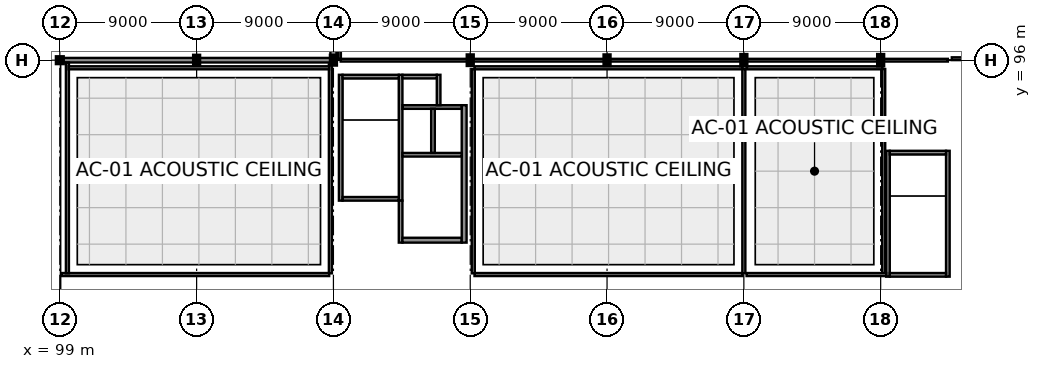
"""IFC4 building model, lengths in metres.
Left out: names, types, materials, properties, quantities, classifications, styles, units other than length and angle.
Written with IfcOpenShell. Run it as: python <this file> out.ifc"""

import sys

from ifc_helpers import new_model, si_unit, direction, frame, frame_2d, origin, origin_2d, place, context, subcontext, project, spatial, rectangle, hollow_circle, i_section, extrude, element, fill, save


model = new_model("IFC4")
c1 = context("Model", 3, precision=1e-05, world=origin(), true_north=direction((0.0, 1.0)))
c2 = subcontext(c1, "Body", "Model", "MODEL_VIEW")
j1 = project(units=[si_unit("LENGTHUNIT", "METRE"), si_unit("PLANEANGLEUNIT", "RADIAN")], contexts=[c1])
p1 = place(None, origin())
s1 = spatial("IfcSite", under=j1, at=p1, CompositionType="ELEMENT")
p2 = place(p1, origin())
s2 = spatial("IfcBuilding", under=s1, at=p2, CompositionType="ELEMENT")
p3 = place(p2, frame((0.0, 0.0, 5.4)))
s3 = spatial("IfcBuildingStorey", under=s2, at=p3, CompositionType="ELEMENT", Elevation=5.4)
p4 = place(p3, frame((99.0, 96.0, 0.0), z_axis=(0.0, 0.0, 1.0), x_axis=(1.0, 0.0, 0.0)))
e1 = element("IfcColumn", 1, at=p4, inside=s3, PredefinedType="PILASTER", context=c2, shape_type="SweptSolid", body=[
    extrude(hollow_circle(Radius=0.178, WallThickness=0.016, at=origin_2d()), origin(), (0.0, 0.0, 1.0), 4.5),
])
for number, where, z_axis, x_axis in (
    (2, (108.0, 96.0, 0.0), (0.0, 0.0, 1.0), (1.0, 0.0, 0.0)),
    (3, (117.0, 96.0, 0.0), (0.0, 0.0, 1.0), (1.0, 0.0, 0.0)),
):
    element("IfcColumn", number, at=place(p3, frame(where, z_axis=z_axis, x_axis=x_axis)), inside=s3, PredefinedType="COLUMN", context=c2, shape_type="SweptSolid", body=[
        extrude(i_section(OverallWidth=0.3, OverallDepth=0.55, WebThickness=0.015, FlangeThickness=0.029, at=origin_2d()), origin(), (0.0, 0.0, 1.0), 4.5),
    ])
for number, where, z_axis, x_axis in (
    (4, (126.0, 96.0, 0.0), (0.0, 0.0, 1.0), (0.0, 1.0, 0.0)),
    (5, (135.0, 96.0, 0.0), (0.0, 0.0, 1.0), (1.0, 0.0, 0.0)),
):
    element("IfcColumn", number, at=place(p3, frame(where, z_axis=z_axis, x_axis=x_axis)), inside=s3, PredefinedType="COLUMN", context=c2, shape_type="SweptSolid", body=[
        extrude(i_section(OverallWidth=0.3, OverallDepth=0.6, WebThickness=0.015, FlangeThickness=0.03, at=origin_2d()), origin(), (0.0, 0.0, 1.0), 4.5),
    ])
for number, where, z_axis, x_axis in (
    (6, (144.0, 96.0, 0.0), (0.0, 0.0, 1.0), (1.0, 0.0, 0.0)),
    (7, (153.0, 96.0, 0.0), (0.0, 0.0, 1.0), (1.0, 0.0, 0.0)),
):
    element("IfcColumn", number, at=place(p3, frame(where, z_axis=z_axis, x_axis=x_axis)), inside=s3, PredefinedType="COLUMN", context=c2, shape_type="SweptSolid", body=[
        extrude(i_section(OverallWidth=0.3, OverallDepth=0.65, WebThickness=0.016, FlangeThickness=0.031, at=origin_2d()), origin(), (0.0, 0.0, 1.0), 4.5),
    ])
p5 = place(p3, frame((116.992, 96.0, 0.0), z_axis=(0.0, 0.0, 1.0), x_axis=(-1.0, 0.0, 0.0)))
e8 = element("IfcWall", 8, at=p5, inside=s3, PredefinedType="SOLIDWALL", context=c2, shape_type="SweptSolid", body=[
    extrude(rectangle(XDim=8.984, YDim=0.3, at=frame_2d((4.492, 0.0))), origin(), (0.0, 0.0, 1.0), 3.655),
])
p6 = place(p3, frame((107.992, 96.0, 0.0), z_axis=(0.0, 0.0, 1.0), x_axis=(-1.0, 0.0, 0.0)))
e9 = element("IfcWall", 9, at=p6, inside=s3, PredefinedType="SOLIDWALL", context=c2, shape_type="SweptSolid", body=[
    extrude(rectangle(XDim=8.768, YDim=0.3, at=frame_2d((4.384, 0.0))), origin(), (0.0, 0.0, 1.0), 3.655),
])
p7 = place(p6, frame((1.455, 0.0, 0.8)))
e10 = element("IfcOpeningElement", 10, at=p7, cuts=e9, PredefinedType="OPENING", context=c2, shape_type="SweptSolid", body=[
    extrude(rectangle(XDim=2.0, YDim=2.0, at=frame_2d((1.0, 1.0))), frame((0.0, 0.165, 0.0), z_axis=(0.0, -1.0, 0.0), x_axis=(1.0, 0.0, 0.0)), (0.0, 0.0, 1.0), 0.33),
])
p8 = place(p6, frame((5.313, 0.0, 0.8)))
e11 = element("IfcOpeningElement", 11, at=p8, cuts=e9, PredefinedType="OPENING", context=c2, shape_type="SweptSolid", body=[
    extrude(rectangle(XDim=2.0, YDim=2.0, at=frame_2d((1.0, 1.0))), frame((0.0, 0.165, 0.0), z_axis=(0.0, -1.0, 0.0), x_axis=(1.0, 0.0, 0.0)), (0.0, 0.0, 1.0), 0.33),
])
p9 = place(p3, frame((117.0, 107.862, 0.0), z_axis=(0.0, 0.0, 1.0), x_axis=(0.0, -1.0, 0.0)))
e12 = element("IfcWall", 12, at=p9, inside=s3, PredefinedType="SOLIDWALL", context=c2, shape_type="SweptSolid", body=[
    extrude(rectangle(XDim=11.589, YDim=0.4, at=frame_2d((5.794, 0.0))), origin(), (0.0, 0.0, 1.0), 4.18),
])
p10 = place(p9, frame((2.877, 0.0, 2.35)))
e13 = element("IfcOpeningElement", 13, at=p10, cuts=e12, PredefinedType="OPENING", context=c2, shape_type="SweptSolid", body=[
    extrude(rectangle(XDim=1.2, YDim=0.7, at=frame_2d((0.6, 0.35))), frame((0.0, 0.215, 0.0), z_axis=(0.0, -1.0, 0.0), x_axis=(1.0, 0.0, 0.0)), (0.0, 0.0, 1.0), 0.43),
])
p11 = place(p9, frame((7.512, 0.0, 2.35)))
e14 = element("IfcOpeningElement", 14, at=p11, cuts=e12, PredefinedType="OPENING", context=c2, shape_type="SweptSolid", body=[
    extrude(rectangle(XDim=1.2, YDim=0.7, at=frame_2d((0.6, 0.35))), frame((0.0, 0.215, 0.0), z_axis=(0.0, -1.0, 0.0), x_axis=(1.0, 0.0, 0.0)), (0.0, 0.0, 1.0), 0.43),
])
p12 = place(p3, frame((117.48, 86.76, 0.0), z_axis=(0.0, 0.0, 1.0), x_axis=(0.0, 1.0, 0.0)))
e15 = element("IfcWall", 15, at=p12, inside=s3, PredefinedType="SHEAR", context=c2, shape_type="SweptSolid", body=[
    extrude(rectangle(XDim=8.28, YDim=0.24, at=frame_2d((4.14, 0.0))), origin(), (0.0, 0.0, 1.0), 4.31),
])
p13 = place(p3, frame((121.42, 86.76, 0.0), z_axis=(0.0, 0.0, 1.0), x_axis=(0.0, 1.0, 0.0)))
e16 = element("IfcWall", 16, at=p13, inside=s3, PredefinedType="SHEAR", context=c2, shape_type="SweptSolid", body=[
    extrude(rectangle(XDim=8.28, YDim=0.24, at=frame_2d((4.14, 0.0))), origin(), (0.0, 0.0, 1.0), 4.31),
])
p14 = place(p13, frame((0.54, 0.0, 0.0)))
e17 = element("IfcOpeningElement", 17, at=p14, cuts=e16, PredefinedType="OPENING", context=c2, shape_type="SweptSolid", body=[
    extrude(rectangle(XDim=1.2, YDim=2.15, at=frame_2d((0.6, 1.075))), frame((0.0, 0.135, 0.0), z_axis=(0.0, -1.0, 0.0), x_axis=(1.0, 0.0, 0.0)), (0.0, 0.0, 1.0), 0.27),
])
for number, where, z_axis, x_axis in (
    (18, (117.6, 86.88, 0.0), (0.0, 0.0, 1.0), (1.0, 0.0, 0.0)),
    (19, (117.6, 94.92, 0.0), (0.0, 0.0, 1.0), (1.0, 0.0, 0.0)),
):
    element("IfcWall", number, at=place(p3, frame(where, z_axis=z_axis, x_axis=x_axis)), inside=s3, PredefinedType="SHEAR", context=c2, shape_type="SweptSolid", body=[
        extrude(rectangle(XDim=3.7, YDim=0.24, at=frame_2d((1.85, 0.0))), origin(), (0.0, 0.0, 1.0), 4.31),
    ])
p15 = place(p3, frame((153.48, 81.76, 0.0), z_axis=(0.0, 0.0, 1.0), x_axis=(0.0, 1.0, 0.0)))
e20 = element("IfcWall", 20, at=p15, inside=s3, PredefinedType="SHEAR", context=c2, shape_type="SweptSolid", body=[
    extrude(rectangle(XDim=8.28, YDim=0.24, at=frame_2d((4.14, 0.0))), origin(), (0.0, 0.0, 1.0), 4.31),
])
p16 = place(p3, frame((157.42, 81.76, 0.0), z_axis=(0.0, 0.0, 1.0), x_axis=(0.0, 1.0, 0.0)))
e21 = element("IfcWall", 21, at=p16, inside=s3, PredefinedType="SHEAR", context=c2, shape_type="SweptSolid", body=[
    extrude(rectangle(XDim=8.28, YDim=0.24, at=frame_2d((4.14, 0.0))), origin(), (0.0, 0.0, 1.0), 4.31),
])
p17 = place(p16, frame((0.49, 0.0, 0.0)))
e22 = element("IfcOpeningElement", 22, at=p17, cuts=e21, PredefinedType="OPENING", context=c2, shape_type="SweptSolid", body=[
    extrude(rectangle(XDim=1.3, YDim=2.2, at=frame_2d((0.65, 1.1))), frame((0.0, 0.135, 0.0), z_axis=(0.0, -1.0, 0.0), x_axis=(1.0, 0.0, 0.0)), (0.0, 0.0, 1.0), 0.27),
])
for number, where, z_axis, x_axis in (
    (23, (153.6, 81.88, 0.0), (0.0, 0.0, 1.0), (1.0, 0.0, 0.0)),
    (24, (153.6, 89.92, 0.0), (0.0, 0.0, 1.0), (1.0, 0.0, 0.0)),
):
    element("IfcWall", number, at=place(p3, frame(where, z_axis=z_axis, x_axis=x_axis)), inside=s3, PredefinedType="SHEAR", context=c2, shape_type="SweptSolid", body=[
        extrude(rectangle(XDim=3.7, YDim=0.24, at=frame_2d((1.85, 0.0))), origin(), (0.0, 0.0, 1.0), 4.31),
    ])
p18 = place(p3, frame((121.42, 84.0, 0.0), z_axis=(0.0, 0.0, 1.0), x_axis=(0.0, 1.0, 0.0)))
e25 = element("IfcWall", 25, at=p18, inside=s3, PredefinedType="SHEAR", context=c2, shape_type="SweptSolid", body=[
    extrude(rectangle(XDim=2.76, YDim=0.24, at=frame_2d((1.38, 0.0))), origin(), (0.0, 0.0, 1.0), 4.16),
])
p19 = place(p3, frame((121.54, 84.16, 0.0), z_axis=(0.0, 0.0, 1.0), x_axis=(1.0, 0.0, 0.0)))
e26 = element("IfcWall", 26, at=p19, inside=s3, PredefinedType="SHEAR", context=c2, shape_type="SweptSolid", body=[
    extrude(rectangle(XDim=3.9, YDim=0.32, at=frame_2d((1.95, 0.0))), origin(), (0.0, 0.0, 1.0), 4.16),
])
p20 = place(p19, frame((1.225, 0.0, 0.0)))
e27 = element("IfcOpeningElement", 27, at=p20, cuts=e26, PredefinedType="OPENING", context=c2, shape_type="SweptSolid", body=[
    extrude(rectangle(XDim=1.45, YDim=2.2, at=frame_2d((0.725, 1.1))), frame((0.0, 0.175, 0.0), z_axis=(0.0, -1.0, 0.0), x_axis=(1.0, 0.0, 0.0)), (0.0, 0.0, 1.0), 0.35),
])
p21 = place(p3, frame((125.6, 84.0, 0.0), z_axis=(0.0, 0.0, 1.0), x_axis=(0.0, 1.0, 0.0)))
e28 = element("IfcWall", 28, at=p21, inside=s3, PredefinedType="SHEAR", context=c2, shape_type="SweptSolid", body=[
    extrude(rectangle(XDim=9.04, YDim=0.32, at=frame_2d((4.52, 0.0))), origin(), (0.0, 0.0, 1.0), 4.16),
])
p22 = place(p3, frame((121.54, 89.78, 0.0), z_axis=(0.0, 0.0, 1.0), x_axis=(1.0, 0.0, 0.0)))
e29 = element("IfcWall", 29, at=p22, inside=s3, PredefinedType="SHEAR", context=c2, shape_type="SweptSolid", body=[
    extrude(rectangle(XDim=3.9, YDim=0.24, at=frame_2d((1.95, 0.0))), origin(), (0.0, 0.0, 1.0), 4.31),
])
p23 = place(p22, frame((0.385, 0.0, 0.0)))
e30 = element("IfcOpeningElement", 30, at=p23, cuts=e29, PredefinedType="OPENING", context=c2, shape_type="SweptSolid", body=[
    extrude(rectangle(XDim=1.3, YDim=2.2, at=frame_2d((0.65, 1.1))), frame((0.0, 0.135, 0.0), z_axis=(0.0, -1.0, 0.0), x_axis=(1.0, 0.0, 0.0)), (0.0, 0.0, 1.0), 0.27),
])
p24 = place(p22, frame((2.335, 0.0, 0.0)))
e31 = element("IfcOpeningElement", 31, at=p24, cuts=e29, PredefinedType="OPENING", context=c2, shape_type="SweptSolid", body=[
    extrude(rectangle(XDim=1.3, YDim=2.2, at=frame_2d((0.65, 1.1))), frame((0.0, 0.135, 0.0), z_axis=(0.0, -1.0, 0.0), x_axis=(1.0, 0.0, 0.0)), (0.0, 0.0, 1.0), 0.27),
])
p25 = place(p3, frame((121.54, 92.92, 0.0), z_axis=(0.0, 0.0, 1.0), x_axis=(1.0, 0.0, 0.0)))
e32 = element("IfcWall", 32, at=p25, inside=s3, PredefinedType="SHEAR", context=c2, shape_type="SweptSolid", body=[
    extrude(rectangle(XDim=3.9, YDim=0.24, at=frame_2d((1.95, 0.0))), origin(), (0.0, 0.0, 1.0), 4.31),
])
p26 = place(p3, frame((123.55, 89.9, 0.0), z_axis=(0.0, 0.0, 1.0), x_axis=(0.0, 1.0, 0.0)))
e33 = element("IfcWall", 33, at=p26, inside=s3, PredefinedType="SHEAR", context=c2, shape_type="SweptSolid", body=[
    extrude(rectangle(XDim=2.9, YDim=0.24, at=frame_2d((1.45, 0.0))), origin(), (0.0, 0.0, 1.0), 4.31),
])
p27 = place(p3, frame((123.92, 93.04, 0.0), z_axis=(0.0, 0.0, 1.0), x_axis=(0.0, 1.0, 0.0)))
e34 = element("IfcWall", 34, at=p27, inside=s3, PredefinedType="SHEAR", context=c2, shape_type="SweptSolid", body=[
    extrude(rectangle(XDim=2.0, YDim=0.24, at=frame_2d((1.0, 0.0))), origin(), (0.0, 0.0, 1.0), 4.31),
])
p28 = place(p3, frame((121.54, 94.92, 0.0), z_axis=(0.0, 0.0, 1.0), x_axis=(1.0, 0.0, 0.0)))
e35 = element("IfcWall", 35, at=p28, inside=s3, PredefinedType="SHEAR", context=c2, shape_type="SweptSolid", body=[
    extrude(rectangle(XDim=2.26, YDim=0.24, at=frame_2d((1.13, 0.0))), origin(), (0.0, 0.0, 1.0), 4.31),
])
p29 = place(p3, frame((116.8, 95.727, 0.0), z_axis=(0.0, 0.0, 1.0), x_axis=(0.0, -1.0, 0.0)))
e36 = element("IfcWall", 36, at=p29, inside=s3, PredefinedType="PARTITIONING", context=c2, shape_type="SweptSolid", body=[
    extrude(rectangle(XDim=13.747, YDim=0.2, at=frame_2d((6.874, 0.0))), origin(), (0.0, 0.0, 1.0), 3.545),
])
p30 = place(p3, frame((116.72, 81.9, 0.0), z_axis=(0.0, 0.0, 1.0), x_axis=(-1.0, 0.0, 0.0)))
e37 = element("IfcWall", 37, at=p30, inside=s3, PredefinedType="PARTITIONING", context=c2, shape_type="SweptSolid", body=[
    extrude(rectangle(XDim=17.595, YDim=0.2, at=frame_2d((8.797, 0.0))), origin(), (0.0, 0.0, 1.0), 4.14),
])
p31 = place(p30, frame((7.797, 0.0, 0.0)))
e38 = element("IfcOpeningElement", 38, at=p31, cuts=e37, PredefinedType="OPENING", context=c2, shape_type="SweptSolid", body=[
    extrude(rectangle(XDim=2.0, YDim=2.6, at=frame_2d((1.0, 1.3))), frame((0.0, 0.115, 0.0), z_axis=(0.0, -1.0, 0.0), x_axis=(1.0, 0.0, 0.0)), (0.0, 0.0, 1.0), 0.23),
])
p32 = place(p30, frame((15.545, 0.0, 1.05)))
e39 = element("IfcOpeningElement", 39, at=p32, cuts=e37, PredefinedType="OPENING", context=c2, shape_type="SweptSolid", body=[
    extrude(rectangle(XDim=1.2, YDim=1.0, at=frame_2d((0.6, 0.5))), frame((0.0, 0.115, 0.0), z_axis=(0.0, -1.0, 0.0), x_axis=(1.0, 0.0, 0.0)), (0.0, 0.0, 1.0), 0.23),
])
p33 = place(p3, frame((99.5, 81.98, 0.0), z_axis=(0.0, 0.0, 1.0), x_axis=(0.0, 1.0, 0.0)))
e40 = element("IfcWall", 40, at=p33, inside=s3, PredefinedType="PARTITIONING", context=c2, shape_type="SweptSolid", body=[
    extrude(rectangle(XDim=13.875, YDim=0.2, at=frame_2d((6.938, 0.0))), origin(), (0.0, 0.0, 1.0), 4.14),
])
p34 = place(p3, frame((99.58, 95.5, 0.0), z_axis=(0.0, 0.0, 1.0), x_axis=(1.0, 0.0, 0.0)))
e41 = element("IfcWall", 41, at=p34, inside=s3, PredefinedType="PARTITIONING", context=c2, shape_type="SweptSolid", body=[
    extrude(rectangle(XDim=17.14, YDim=0.2, at=frame_2d((8.57, 0.0))), origin(), (0.0, 0.0, 1.0), 4.14),
])
p35 = place(p3, frame((143.92, 81.9, 0.0), z_axis=(0.0, 0.0, 1.0), x_axis=(-1.0, 0.0, 0.0)))
e42 = element("IfcWall", 42, at=p35, inside=s3, PredefinedType="PARTITIONING", context=c2, shape_type="SweptSolid", body=[
    extrude(rectangle(XDim=17.64, YDim=0.2, at=frame_2d((8.82, 0.0))), origin(), (0.0, 0.0, 1.0), 4.14),
])
p36 = place(p35, frame((7.87, 0.0, 0.0)))
e43 = element("IfcOpeningElement", 43, at=p36, cuts=e42, PredefinedType="OPENING", context=c2, shape_type="SweptSolid", body=[
    extrude(rectangle(XDim=1.9, YDim=2.5, at=frame_2d((0.95, 1.25))), frame((0.0, 0.115, 0.0), z_axis=(0.0, -1.0, 0.0), x_axis=(1.0, 0.0, 0.0)), (0.0, 0.0, 1.0), 0.23),
])
p37 = place(p35, frame((14.69, 0.0, 1.05)))
e44 = element("IfcOpeningElement", 44, at=p37, cuts=e42, PredefinedType="OPENING", context=c2, shape_type="SweptSolid", body=[
    extrude(rectangle(XDim=2.1, YDim=1.2, at=frame_2d((1.05, 0.6))), frame((0.0, 0.115, 0.0), z_axis=(0.0, -1.0, 0.0), x_axis=(1.0, 0.0, 0.0)), (0.0, 0.0, 1.0), 0.23),
])
p38 = place(p3, frame((126.2, 81.98, 0.0), z_axis=(0.0, 0.0, 1.0), x_axis=(0.0, 1.0, 0.0)))
e45 = element("IfcWall", 45, at=p38, inside=s3, PredefinedType="PARTITIONING", context=c2, shape_type="SweptSolid", body=[
    extrude(rectangle(XDim=13.44, YDim=0.2, at=frame_2d((6.72, 0.0))), origin(), (0.0, 0.0, 1.0), 3.495),
])
p39 = place(p3, frame((126.28, 95.5, 0.0), z_axis=(0.0, 0.0, 1.0), x_axis=(1.0, 0.0, 0.0)))
e46 = element("IfcWall", 46, at=p39, inside=s3, PredefinedType="PARTITIONING", context=c2, shape_type="SweptSolid", body=[
    extrude(rectangle(XDim=17.64, YDim=0.2, at=frame_2d((8.82, 0.0))), origin(), (0.0, 0.0, 1.0), 4.14),
])
p40 = place(p3, frame((144.0, 95.42, 0.0), z_axis=(0.0, 0.0, 1.0), x_axis=(0.0, -1.0, 0.0)))
e47 = element("IfcWall", 47, at=p40, inside=s3, PredefinedType="PARTITIONING", context=c2, shape_type="SweptSolid", body=[
    extrude(rectangle(XDim=13.44, YDim=0.2, at=frame_2d((6.72, 0.0))), origin(), (0.0, 0.0, 1.0), 3.405),
])
p41 = place(p3, frame((144.18, 95.5, 0.0), z_axis=(0.0, 0.0, 1.0), x_axis=(1.0, 0.0, 0.0)))
e48 = element("IfcWall", 48, at=p41, inside=s3, PredefinedType="PARTITIONING", context=c2, shape_type="SweptSolid", body=[
    extrude(rectangle(XDim=8.94, YDim=0.2, at=frame_2d((4.47, 0.0))), origin(), (0.0, 0.0, 1.0), 4.14),
])
p42 = place(p3, frame((153.2, 95.42, 0.0), z_axis=(0.0, 0.0, 1.0), x_axis=(0.0, -1.0, 0.0)))
e49 = element("IfcWall", 49, at=p42, inside=s3, PredefinedType="PARTITIONING", context=c2, shape_type="SweptSolid", body=[
    extrude(rectangle(XDim=13.44, YDim=0.2, at=frame_2d((6.72, 0.0))), origin(), (0.0, 0.0, 1.0), 3.395),
])
p43 = place(p3, frame((153.365, 81.9, 0.0), z_axis=(0.0, 0.0, 1.0), x_axis=(-1.0, 0.0, 0.0)))
e50 = element("IfcWall", 50, at=p43, inside=s3, PredefinedType="PARTITIONING", context=c2, shape_type="SweptSolid", body=[
    extrude(rectangle(XDim=9.185, YDim=0.2, at=frame_2d((4.593, 0.0))), origin(), (0.0, 0.0, 1.0), 4.14),
])
p44 = place(p43, frame((3.693, 0.0, 0.0)))
e51 = element("IfcOpeningElement", 51, at=p44, cuts=e50, PredefinedType="OPENING", context=c2, shape_type="SweptSolid", body=[
    extrude(rectangle(XDim=1.8, YDim=2.45, at=frame_2d((0.9, 1.225))), frame((0.0, 0.115, 0.0), z_axis=(0.0, -1.0, 0.0), x_axis=(1.0, 0.0, 0.0)), (0.0, 0.0, 1.0), 0.23),
])
p45 = place(p3, frame((157.42, 96.0, 0.0), z_axis=(0.0, 0.0, 1.0), x_axis=(-1.0, 0.0, 0.0)))
e52 = element("IfcWall", 52, at=p45, inside=s3, PredefinedType="PARTITIONING", context=c2, shape_type="SweptSolid", body=[
    extrude(rectangle(XDim=31.34, YDim=0.18, at=frame_2d((15.67, 0.0))), origin(), (0.0, 0.0, 1.0), 3.187),
])
p46 = place(p3, frame((125.92, 96.0, 0.0), z_axis=(0.0, 0.0, 1.0), x_axis=(-1.0, 0.0, 0.0)))
e53 = element("IfcWall", 53, at=p46, inside=s3, PredefinedType="PARTITIONING", context=c2, shape_type="SweptSolid", body=[
    extrude(rectangle(XDim=8.44, YDim=0.18, at=frame_2d((4.22, 0.0))), origin(), (0.0, 0.0, 1.0), 3.655),
])
p47 = place(p3, frame((117.4, 96.08, 0.0), z_axis=(0.0, 0.0, 1.0), x_axis=(0.0, 1.0, 0.0)))
e54 = element("IfcWall", 54, at=p47, inside=s3, PredefinedType="PARTITIONING", context=c2, shape_type="SweptSolid", body=[
    extrude(rectangle(XDim=15.84, YDim=0.18, at=frame_2d((7.92, 0.0))), origin(), (0.0, 0.0, 1.0), 4.14),
])
p48 = place(p3, frame((161.42, 96.1, 0.0), z_axis=(0.0, 0.0, 1.0), x_axis=(-1.0, 0.0, 0.0)))
e55 = element("IfcWall", 55, at=p48, inside=s3, PredefinedType="PARTITIONING", context=c2, shape_type="SweptSolid", body=[
    extrude(rectangle(XDim=3.74, YDim=0.18, at=frame_2d((1.87, 0.0))), origin(), (0.0, 0.0, 1.0), 3.187),
])
p49 = place(p48, frame((1.295, 0.0, 0.0)))
e56 = element("IfcOpeningElement", 56, at=p49, cuts=e55, PredefinedType="OPENING", context=c2, shape_type="SweptSolid", body=[
    extrude(rectangle(XDim=1.15, YDim=2.15, at=frame_2d((0.575, 1.075))), frame((0.0, 0.105, 0.0), z_axis=(0.0, -1.0, 0.0), x_axis=(1.0, 0.0, 0.0)), (0.0, 0.0, 1.0), 0.21),
])
p50 = place(p7, origin())
e57 = element("IfcWindow", 57, at=p50, inside=s3, PartitioningType="SINGLE_PANEL", PredefinedType="WINDOW", context=c2, shape_type="SweptSolid", body=[
    extrude(rectangle(XDim=2.0, YDim=2.0, at=frame_2d((1.0, 1.0))), frame((0.0, 0.03, 0.0), z_axis=(0.0, -1.0, 0.0), x_axis=(1.0, 0.0, 0.0)), (0.0, 0.0, 1.0), 0.06),
])
fill(e10, e57)
p51 = place(p8, origin())
e58 = element("IfcWindow", 58, at=p51, inside=s3, PartitioningType="SINGLE_PANEL", PredefinedType="WINDOW", context=c2, shape_type="SweptSolid", body=[
    extrude(rectangle(XDim=2.0, YDim=2.0, at=frame_2d((1.0, 1.0))), frame((0.0, 0.03, 0.0), z_axis=(0.0, -1.0, 0.0), x_axis=(1.0, 0.0, 0.0)), (0.0, 0.0, 1.0), 0.06),
])
fill(e11, e58)
p52 = place(p14, frame((1.2, 0.0, 0.0), z_axis=(0.0, 0.0, 1.0), x_axis=(-1.0, 0.0, 0.0)))
e59 = element("IfcDoor", 59, at=p52, inside=s3, OperationType="SINGLE_SWING_LEFT", PredefinedType="DOOR", context=c2, shape_type="SweptSolid", body=[
    extrude(rectangle(XDim=1.2, YDim=2.15, at=frame_2d((0.6, 1.075))), frame((0.0, 0.025, 0.0), z_axis=(0.0, -1.0, 0.0), x_axis=(1.0, 0.0, 0.0)), (0.0, 0.0, 1.0), 0.05),
])
fill(e17, e59)
p53 = place(p17, frame((1.3, 0.0, 0.0), z_axis=(0.0, 0.0, 1.0), x_axis=(-1.0, 0.0, 0.0)))
e60 = element("IfcDoor", 60, at=p53, inside=s3, OperationType="SINGLE_SWING_RIGHT", PredefinedType="DOOR", context=c2, shape_type="SweptSolid", body=[
    extrude(rectangle(XDim=1.3, YDim=2.2, at=frame_2d((0.65, 1.1))), frame((0.0, 0.025, 0.0), z_axis=(0.0, -1.0, 0.0), x_axis=(1.0, 0.0, 0.0)), (0.0, 0.0, 1.0), 0.05),
])
fill(e22, e60)
p54 = place(p20, origin())
e61 = element("IfcDoor", 61, at=p54, inside=s3, OperationType="DOUBLE_DOOR_SINGLE_SWING", PredefinedType="DOOR", context=c2, shape_type="SweptSolid", body=[
    extrude(rectangle(XDim=1.45, YDim=2.2, at=frame_2d((0.725, 1.1))), frame((0.0, 0.025, 0.0), z_axis=(0.0, -1.0, 0.0), x_axis=(1.0, 0.0, 0.0)), (0.0, 0.0, 1.0), 0.05),
])
fill(e27, e61)
p55 = place(p23, origin())
e62 = element("IfcDoor", 62, at=p55, inside=s3, OperationType="DOUBLE_DOOR_SLIDING", PredefinedType="DOOR", context=c2, shape_type="SweptSolid", body=[
    extrude(rectangle(XDim=1.3, YDim=2.2, at=frame_2d((0.65, 1.1))), frame((0.0, 0.025, 0.0), z_axis=(0.0, -1.0, 0.0), x_axis=(1.0, 0.0, 0.0)), (0.0, 0.0, 1.0), 0.05),
])
fill(e30, e62)
p56 = place(p24, origin())
e63 = element("IfcDoor", 63, at=p56, inside=s3, OperationType="DOUBLE_DOOR_SLIDING", PredefinedType="DOOR", context=c2, shape_type="SweptSolid", body=[
    extrude(rectangle(XDim=1.3, YDim=2.2, at=frame_2d((0.65, 1.1))), frame((0.0, 0.025, 0.0), z_axis=(0.0, -1.0, 0.0), x_axis=(1.0, 0.0, 0.0)), (0.0, 0.0, 1.0), 0.05),
])
fill(e31, e63)
p57 = place(p31, origin())
e64 = element("IfcDoor", 64, at=p57, inside=s3, OperationType="DOUBLE_DOOR_SINGLE_SWING", PredefinedType="DOOR", context=c2, shape_type="SweptSolid", body=[
    extrude(rectangle(XDim=2.0, YDim=2.6, at=frame_2d((1.0, 1.3))), frame((0.0, 0.025, 0.0), z_axis=(0.0, -1.0, 0.0), x_axis=(1.0, 0.0, 0.0)), (0.0, 0.0, 1.0), 0.05),
])
fill(e38, e64)
p58 = place(p32, origin())
e65 = element("IfcWindow", 65, at=p58, inside=s3, PartitioningType="SINGLE_PANEL", PredefinedType="WINDOW", context=c2, shape_type="SweptSolid", body=[
    extrude(rectangle(XDim=1.2, YDim=1.0, at=frame_2d((0.6, 0.5))), frame((0.0, 0.03, 0.0), z_axis=(0.0, -1.0, 0.0), x_axis=(1.0, 0.0, 0.0)), (0.0, 0.0, 1.0), 0.06),
])
fill(e39, e65)
p59 = place(p36, frame((1.9, 0.0, 0.0), z_axis=(0.0, 0.0, 1.0), x_axis=(-1.0, 0.0, 0.0)))
e66 = element("IfcDoor", 66, at=p59, inside=s3, OperationType="DOUBLE_DOOR_SINGLE_SWING", PredefinedType="DOOR", context=c2, shape_type="SweptSolid", body=[
    extrude(rectangle(XDim=1.9, YDim=2.5, at=frame_2d((0.95, 1.25))), frame((0.0, 0.025, 0.0), z_axis=(0.0, -1.0, 0.0), x_axis=(1.0, 0.0, 0.0)), (0.0, 0.0, 1.0), 0.05),
])
fill(e43, e66)
p60 = place(p37, origin())
e67 = element("IfcWindow", 67, at=p60, inside=s3, PartitioningType="SINGLE_PANEL", PredefinedType="WINDOW", context=c2, shape_type="SweptSolid", body=[
    extrude(rectangle(XDim=2.1, YDim=1.2, at=frame_2d((1.05, 0.6))), frame((0.0, 0.03, 0.0), z_axis=(0.0, -1.0, 0.0), x_axis=(1.0, 0.0, 0.0)), (0.0, 0.0, 1.0), 0.06),
])
fill(e44, e67)
p61 = place(p44, origin())
e68 = element("IfcDoor", 68, at=p61, inside=s3, OperationType="DOUBLE_DOOR_SINGLE_SWING", PredefinedType="DOOR", context=c2, shape_type="SweptSolid", body=[
    extrude(rectangle(XDim=1.8, YDim=2.45, at=frame_2d((0.9, 1.225))), frame((0.0, 0.025, 0.0), z_axis=(0.0, -1.0, 0.0), x_axis=(1.0, 0.0, 0.0)), (0.0, 0.0, 1.0), 0.05),
])
fill(e51, e68)
save(model, sys.argv[1])
